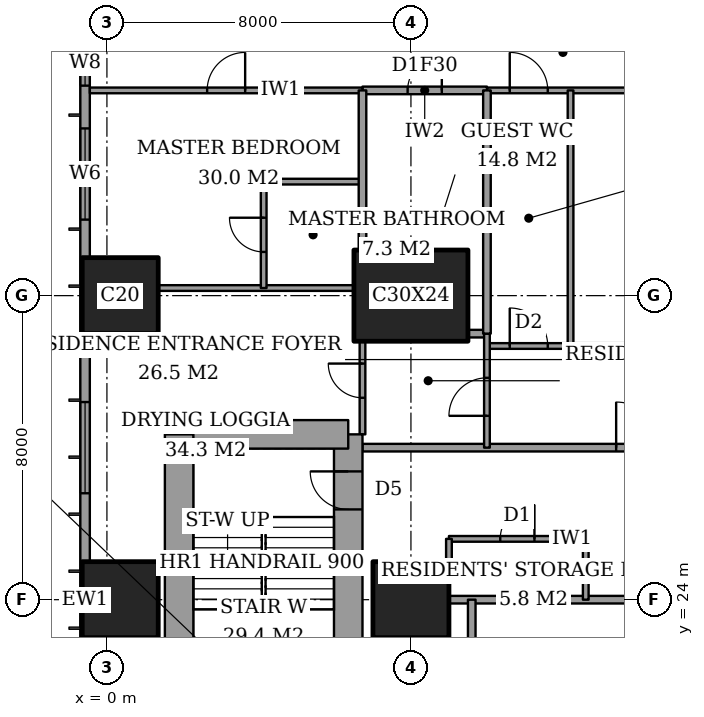
"""IFC4 building model, lengths in metres.
Left out: names, types, materials, properties, quantities, classifications, styles, units other than length and angle.
Written with IfcOpenShell. Run it as: python <this file> out.ifc"""

import sys

from ifc_helpers import new_model, si_unit, direction, frame, frame_2d, origin, origin_2d, place, context, subcontext, project, spatial, rectangle, extrude, element, fill, save


model = new_model("IFC4")
c1 = context("Model", 3, precision=1e-05, world=origin(), true_north=direction((0.0, 1.0)))
c2 = subcontext(c1, "Body", "Model", "MODEL_VIEW")
j1 = project(units=[si_unit("LENGTHUNIT", "METRE"), si_unit("PLANEANGLEUNIT", "RADIAN")], contexts=[c1])
p1 = place(None, origin())
s1 = spatial("IfcSite", under=j1, at=p1, CompositionType="ELEMENT")
p2 = place(p1, origin())
s2 = spatial("IfcBuilding", under=s1, at=p2, CompositionType="ELEMENT")
p3 = place(p2, frame((0.0, 0.0, 80.0)))
s3 = spatial("IfcBuildingStorey", under=s2, at=p3, CompositionType="ELEMENT", Elevation=80.0)
for number, where, z_axis, x_axis in (
    (1, (0.35, 24.0, 0.0), (0.0, 0.0, 1.0), (1.0, 0.0, 0.0)),
    (2, (0.35, 32.0, 0.0), (0.0, 0.0, 1.0), (1.0, 0.0, 0.0)),
    (3, (8.0, 24.0, 0.0), (0.0, 0.0, 1.0), (1.0, 0.0, 0.0)),
):
    element("IfcColumn", number, at=place(p3, frame(where, z_axis=z_axis, x_axis=x_axis)), inside=s3, PredefinedType="COLUMN", context=c2, shape_type="SweptSolid", body=[
        extrude(rectangle(XDim=2.0, YDim=2.0, at=origin_2d()), origin(), (0.0, 0.0, 1.0), 3.6),
    ])
p4 = place(p3, frame((8.0, 32.0, 0.0), z_axis=(0.0, 0.0, 1.0), x_axis=(1.0, 0.0, 0.0)))
e4 = element("IfcColumn", 4, at=p4, inside=s3, PredefinedType="COLUMN", context=c2, shape_type="SweptSolid", body=[
    extrude(rectangle(XDim=3.0, YDim=2.4, at=origin_2d()), origin(), (0.0, 0.0, 1.0), 3.6),
])
p5 = place(p3, frame((6.35, 19.65, 0.0), z_axis=(0.0, 0.0, 1.0), x_axis=(0.0, 1.0, 0.0)))
e5 = element("IfcWall", 5, at=p5, inside=s3, PredefinedType="SHEAR", context=c2, shape_type="SweptSolid", body=[
    extrude(rectangle(XDim=8.7, YDim=0.75, at=frame_2d((4.35, 0.0))), origin(), (0.0, 0.0, 1.0), 3.6),
])
p6 = place(p5, frame((6.725, 0.0, 0.0)))
e6 = element("IfcOpeningElement", 6, at=p6, cuts=e5, PredefinedType="OPENING", context=c2, shape_type="SweptSolid", body=[
    extrude(rectangle(XDim=1.0, YDim=2.1, at=frame_2d((0.5, 1.05))), frame((0.0, 0.385, 0.0), z_axis=(0.0, -1.0, 0.0), x_axis=(1.0, 0.0, 0.0)), (0.0, 0.0, 1.0), 0.77),
])
p7 = place(p3, frame((6.35, 28.35, 0.0), z_axis=(0.0, 0.0, 1.0), x_axis=(-1.0, 0.0, 0.0)))
e7 = element("IfcWall", 7, at=p7, inside=s3, PredefinedType="SHEAR", context=c2, shape_type="SweptSolid", body=[
    extrude(rectangle(XDim=4.45, YDim=0.75, at=frame_2d((2.225, 0.0))), origin(), (0.0, 0.0, 1.0), 3.6),
])
p8 = place(p3, frame((1.9, 28.35, 0.0), z_axis=(0.0, 0.0, 1.0), x_axis=(0.0, -1.0, 0.0)))
e8 = element("IfcWall", 8, at=p8, inside=s3, PredefinedType="SHEAR", context=c2, shape_type="SweptSolid", body=[
    extrude(rectangle(XDim=8.7, YDim=0.75, at=frame_2d((4.35, 0.0))), origin(), (0.0, 0.0, 1.0), 3.6),
])
p9 = place(p3, frame((-0.575, 44.825, 0.0), z_axis=(0.0, 0.0, 1.0), x_axis=(0.0, -1.0, 0.0)))
e9 = element("IfcWall", 9, at=p9, inside=s3, PredefinedType="SOLIDWALL", context=c2, shape_type="SweptSolid", body=[
    extrude(rectangle(XDim=41.65, YDim=0.25, at=frame_2d((20.825, 0.0))), origin(), (0.0, 0.0, 1.0), 3.6),
])
p10 = place(p9, frame((0.775, 0.0, 0.6)))
e10 = element("IfcOpeningElement", 10, at=p10, cuts=e9, PredefinedType="OPENING", context=c2, shape_type="SweptSolid", body=[
    extrude(rectangle(XDim=2.4, YDim=2.0, at=frame_2d((1.2, 1.0))), frame((0.0, 0.135, 0.0), z_axis=(0.0, -1.0, 0.0), x_axis=(1.0, 0.0, 0.0)), (0.0, 0.0, 1.0), 0.27),
])
p11 = place(p9, frame((6.1, 0.0, 0.6)))
e11 = element("IfcOpeningElement", 11, at=p11, cuts=e9, PredefinedType="OPENING", context=c2, shape_type="SweptSolid", body=[
    extrude(rectangle(XDim=1.2, YDim=2.0, at=frame_2d((0.6, 1.0))), frame((0.0, 0.135, 0.0), z_axis=(0.0, -1.0, 0.0), x_axis=(1.0, 0.0, 0.0)), (0.0, 0.0, 1.0), 0.27),
])
p12 = place(p9, frame((8.425, 0.0, 0.6)))
e12 = element("IfcOpeningElement", 12, at=p12, cuts=e9, PredefinedType="OPENING", context=c2, shape_type="SweptSolid", body=[
    extrude(rectangle(XDim=2.4, YDim=2.0, at=frame_2d((1.2, 1.0))), frame((0.0, 0.135, 0.0), z_axis=(0.0, -1.0, 0.0), x_axis=(1.0, 0.0, 0.0)), (0.0, 0.0, 1.0), 0.27),
])
p13 = place(p9, frame((15.625, 0.0, 0.6)))
e13 = element("IfcOpeningElement", 13, at=p13, cuts=e9, PredefinedType="OPENING", context=c2, shape_type="SweptSolid", body=[
    extrude(rectangle(XDim=2.4, YDim=2.0, at=frame_2d((1.2, 1.0))), frame((0.0, 0.135, 0.0), z_axis=(0.0, -1.0, 0.0), x_axis=(1.0, 0.0, 0.0)), (0.0, 0.0, 1.0), 0.27),
])
p14 = place(p9, frame((23.625, 0.0, 0.6)))
e14 = element("IfcOpeningElement", 14, at=p14, cuts=e9, PredefinedType="OPENING", context=c2, shape_type="SweptSolid", body=[
    extrude(rectangle(XDim=2.4, YDim=2.0, at=frame_2d((1.2, 1.0))), frame((0.0, 0.135, 0.0), z_axis=(0.0, -1.0, 0.0), x_axis=(1.0, 0.0, 0.0)), (0.0, 0.0, 1.0), 0.27),
])
p15 = place(p9, frame((30.825, 0.0, 0.6)))
e15 = element("IfcOpeningElement", 15, at=p15, cuts=e9, PredefinedType="OPENING", context=c2, shape_type="SweptSolid", body=[
    extrude(rectangle(XDim=2.4, YDim=2.0, at=frame_2d((1.2, 1.0))), frame((0.0, 0.135, 0.0), z_axis=(0.0, -1.0, 0.0), x_axis=(1.0, 0.0, 0.0)), (0.0, 0.0, 1.0), 0.27),
])
p16 = place(p9, frame((34.5, 0.0, 0.6)))
e16 = element("IfcOpeningElement", 16, at=p16, cuts=e9, PredefinedType="OPENING", context=c2, shape_type="SweptSolid", body=[
    extrude(rectangle(XDim=1.2, YDim=2.0, at=frame_2d((0.6, 1.0))), frame((0.0, 0.135, 0.0), z_axis=(0.0, -1.0, 0.0), x_axis=(1.0, 0.0, 0.0)), (0.0, 0.0, 1.0), 0.27),
])
p17 = place(p9, frame((38.475, 0.0, 0.6)))
e17 = element("IfcOpeningElement", 17, at=p17, cuts=e9, PredefinedType="OPENING", context=c2, shape_type="SweptSolid", body=[
    extrude(rectangle(XDim=2.4, YDim=2.0, at=frame_2d((1.2, 1.0))), frame((0.0, 0.135, 0.0), z_axis=(0.0, -1.0, 0.0), x_axis=(1.0, 0.0, 0.0)), (0.0, 0.0, 1.0), 0.27),
])
p18 = place(p3, frame((9.0, 24.0, 0.0), z_axis=(0.0, 0.0, 1.0), x_axis=(1.0, 0.0, 0.0)))
e18 = element("IfcWall", 18, at=p18, inside=s3, PredefinedType="PARTITIONING", context=c2, shape_type="SweptSolid", body=[
    extrude(rectangle(XDim=6.0, YDim=0.2, at=frame_2d((3.0, 0.0))), origin(), (0.0, 0.0, 1.0), 3.35),
])
p19 = place(p3, frame((9.0, 25.6, 0.0), z_axis=(0.0, 0.0, 1.0), x_axis=(1.0, 0.0, 0.0)))
e19 = element("IfcWall", 19, at=p19, inside=s3, PredefinedType="PARTITIONING", context=c2, shape_type="SweptSolid", body=[
    extrude(rectangle(XDim=3.6, YDim=0.15, at=frame_2d((1.8, 0.0))), origin(), (0.0, 0.0, 1.0), 3.35),
])
p20 = place(p19, frame((1.35, 0.0, 0.0)))
e20 = element("IfcOpeningElement", 20, at=p20, cuts=e19, PredefinedType="OPENING", context=c2, shape_type="SweptSolid", body=[
    extrude(rectangle(XDim=0.9, YDim=2.1, at=frame_2d((0.45, 1.05))), frame((0.0, 0.085, 0.0), z_axis=(0.0, -1.0, 0.0), x_axis=(1.0, 0.0, 0.0)), (0.0, 0.0, 1.0), 0.17),
])
p21 = place(p3, frame((6.725, 28.0, 0.0), z_axis=(0.0, 0.0, 1.0), x_axis=(1.0, 0.0, 0.0)))
e21 = element("IfcWall", 21, at=p21, inside=s3, PredefinedType="PARTITIONING", context=c2, shape_type="SweptSolid", body=[
    extrude(rectangle(XDim=17.275, YDim=0.2, at=frame_2d((8.637, 0.0))), origin(), (0.0, 0.0, 1.0), 3.35),
])
p22 = place(p21, frame((6.675, 0.0, 0.0)))
e22 = element("IfcOpeningElement", 22, at=p22, cuts=e21, PredefinedType="OPENING", context=c2, shape_type="SweptSolid", body=[
    extrude(rectangle(XDim=1.2, YDim=2.4, at=frame_2d((0.6, 1.2))), frame((0.0, 0.11, 0.0), z_axis=(0.0, -1.0, 0.0), x_axis=(1.0, 0.0, 0.0)), (0.0, 0.0, 1.0), 0.22),
])
p23 = place(p3, frame((10.0, 30.675, 0.0), z_axis=(0.0, 0.0, 1.0), x_axis=(1.0, 0.0, 0.0)))
e23 = element("IfcWall", 23, at=p23, inside=s3, PredefinedType="PARTITIONING", context=c2, shape_type="SweptSolid", body=[
    extrude(rectangle(XDim=4.4, YDim=0.15, at=frame_2d((2.2, 0.0))), origin(), (0.0, 0.0, 1.0), 3.35),
])
p24 = place(p23, frame((0.6, 0.0, 0.0)))
e24 = element("IfcOpeningElement", 24, at=p24, cuts=e23, PredefinedType="OPENING", context=c2, shape_type="SweptSolid", body=[
    extrude(rectangle(XDim=1.0, YDim=2.1, at=frame_2d((0.5, 1.05))), frame((0.0, 0.085, 0.0), z_axis=(0.0, -1.0, 0.0), x_axis=(1.0, 0.0, 0.0)), (0.0, 0.0, 1.0), 0.17),
])
p25 = place(p3, frame((9.5, 31.0, 0.0), z_axis=(0.0, 0.0, 1.0), x_axis=(1.0, 0.0, 0.0)))
e25 = element("IfcWall", 25, at=p25, inside=s3, PredefinedType="PARTITIONING", context=c2, shape_type="SweptSolid", body=[
    extrude(rectangle(XDim=0.5, YDim=0.2, at=frame_2d((0.25, 0.0))), origin(), (0.0, 0.0, 1.0), 3.35),
])
p26 = place(p3, frame((1.35, 32.2, 0.0), z_axis=(0.0, 0.0, 1.0), x_axis=(1.0, 0.0, 0.0)))
e26 = element("IfcWall", 26, at=p26, inside=s3, PredefinedType="PARTITIONING", context=c2, shape_type="SweptSolid", body=[
    extrude(rectangle(XDim=5.15, YDim=0.15, at=frame_2d((2.575, 0.0))), origin(), (0.0, 0.0, 1.0), 3.35),
])
p27 = place(p3, frame((4.125, 35.0, 0.0), z_axis=(0.0, 0.0, 1.0), x_axis=(1.0, 0.0, 0.0)))
e27 = element("IfcWall", 27, at=p27, inside=s3, PredefinedType="PARTITIONING", context=c2, shape_type="SweptSolid", body=[
    extrude(rectangle(XDim=2.6, YDim=0.15, at=frame_2d((1.3, 0.0))), origin(), (0.0, 0.0, 1.0), 3.35),
])
p28 = place(p3, frame((6.725, 37.4, 0.0), z_axis=(0.0, 0.0, 1.0), x_axis=(1.0, 0.0, 0.0)))
e28 = element("IfcWall", 28, at=p28, inside=s3, PredefinedType="PARTITIONING", context=c2, shape_type="SweptSolid", body=[
    extrude(rectangle(XDim=3.275, YDim=0.2, at=frame_2d((1.637, 0.0))), origin(), (0.0, 0.0, 1.0), 3.35),
])
p29 = place(p28, frame((1.188, 0.0, 0.0)))
e29 = element("IfcOpeningElement", 29, at=p29, cuts=e28, PredefinedType="OPENING", context=c2, shape_type="SweptSolid", body=[
    extrude(rectangle(XDim=0.9, YDim=2.1, at=frame_2d((0.45, 1.05))), frame((0.0, 0.11, 0.0), z_axis=(0.0, -1.0, 0.0), x_axis=(1.0, 0.0, 0.0)), (0.0, 0.0, 1.0), 0.22),
])
p30 = place(p3, frame((-0.45, 37.4, 0.0), z_axis=(0.0, 0.0, 1.0), x_axis=(1.0, 0.0, 0.0)))
e30 = element("IfcWall", 30, at=p30, inside=s3, PredefinedType="PARTITIONING", context=c2, shape_type="SweptSolid", body=[
    extrude(rectangle(XDim=7.175, YDim=0.15, at=frame_2d((3.587, 0.0))), origin(), (0.0, 0.0, 1.0), 3.35),
])
p31 = place(p30, frame((3.087, 0.0, 0.0)))
e31 = element("IfcOpeningElement", 31, at=p31, cuts=e30, PredefinedType="OPENING", context=c2, shape_type="SweptSolid", body=[
    extrude(rectangle(XDim=1.0, YDim=2.1, at=frame_2d((0.5, 1.05))), frame((0.0, 0.085, 0.0), z_axis=(0.0, -1.0, 0.0), x_axis=(1.0, 0.0, 0.0)), (0.0, 0.0, 1.0), 0.17),
])
p32 = place(p3, frame((10.0, 37.4, 0.0), z_axis=(0.0, 0.0, 1.0), x_axis=(1.0, 0.0, 0.0)))
e32 = element("IfcWall", 32, at=p32, inside=s3, PredefinedType="PARTITIONING", context=c2, shape_type="SweptSolid", body=[
    extrude(rectangle(XDim=14.561, YDim=0.15, at=frame_2d((7.281, 0.0))), origin(), (0.0, 0.0, 1.0), 3.35),
])
p33 = place(p32, frame((0.6, 0.0, 0.0)))
e33 = element("IfcOpeningElement", 33, at=p33, cuts=e32, PredefinedType="OPENING", context=c2, shape_type="SweptSolid", body=[
    extrude(rectangle(XDim=1.0, YDim=2.1, at=frame_2d((0.5, 1.05))), frame((0.0, 0.085, 0.0), z_axis=(0.0, -1.0, 0.0), x_axis=(1.0, 0.0, 0.0)), (0.0, 0.0, 1.0), 0.17),
])
p34 = place(p32, frame((4.6, 0.0, 0.0)))
e34 = element("IfcOpeningElement", 34, at=p34, cuts=e32, PredefinedType="OPENING", context=c2, shape_type="SweptSolid", body=[
    extrude(rectangle(XDim=1.0, YDim=2.1, at=frame_2d((0.5, 1.05))), frame((0.0, 0.085, 0.0), z_axis=(0.0, -1.0, 0.0), x_axis=(1.0, 0.0, 0.0)), (0.0, 0.0, 1.0), 0.17),
])
p35 = place(p32, frame((10.725, 0.0, 0.0)))
e35 = element("IfcOpeningElement", 35, at=p35, cuts=e32, PredefinedType="OPENING", context=c2, shape_type="SweptSolid", body=[
    extrude(rectangle(XDim=1.0, YDim=2.1, at=frame_2d((0.5, 1.05))), frame((0.0, 0.085, 0.0), z_axis=(0.0, -1.0, 0.0), x_axis=(1.0, 0.0, 0.0)), (0.0, 0.0, 1.0), 0.17),
])
p36 = place(p3, frame((4.125, 32.2, 0.0), z_axis=(0.0, 0.0, 1.0), x_axis=(0.0, 1.0, 0.0)))
e36 = element("IfcWall", 36, at=p36, inside=s3, PredefinedType="PARTITIONING", context=c2, shape_type="SweptSolid", body=[
    extrude(rectangle(XDim=2.8, YDim=0.15, at=frame_2d((1.4, 0.0))), origin(), (0.0, 0.0, 1.0), 3.35),
])
p37 = place(p36, frame((0.95, 0.0, 0.0)))
e37 = element("IfcOpeningElement", 37, at=p37, cuts=e36, PredefinedType="OPENING", context=c2, shape_type="SweptSolid", body=[
    extrude(rectangle(XDim=0.9, YDim=2.1, at=frame_2d((0.45, 1.05))), frame((0.0, 0.085, 0.0), z_axis=(0.0, -1.0, 0.0), x_axis=(1.0, 0.0, 0.0)), (0.0, 0.0, 1.0), 0.17),
])
p38 = place(p3, frame((6.725, 33.2, 0.0), z_axis=(0.0, 0.0, 1.0), x_axis=(0.0, 1.0, 0.0)))
e38 = element("IfcWall", 38, at=p38, inside=s3, PredefinedType="PARTITIONING", context=c2, shape_type="SweptSolid", body=[
    extrude(rectangle(XDim=4.2, YDim=0.2, at=frame_2d((2.1, 0.0))), origin(), (0.0, 0.0, 1.0), 3.35),
])
p39 = place(p3, frame((6.725, 28.35, 0.0), z_axis=(0.0, 0.0, 1.0), x_axis=(0.0, 1.0, 0.0)))
e39 = element("IfcWall", 39, at=p39, inside=s3, PredefinedType="PARTITIONING", context=c2, shape_type="SweptSolid", body=[
    extrude(rectangle(XDim=2.45, YDim=0.15, at=frame_2d((1.225, 0.0))), origin(), (0.0, 0.0, 1.0), 3.35),
])
p40 = place(p39, frame((0.962, 0.0, 0.0)))
e40 = element("IfcOpeningElement", 40, at=p40, cuts=e39, PredefinedType="OPENING", context=c2, shape_type="SweptSolid", body=[
    extrude(rectangle(XDim=0.9, YDim=2.1, at=frame_2d((0.45, 1.05))), frame((0.0, 0.085, 0.0), z_axis=(0.0, -1.0, 0.0), x_axis=(1.0, 0.0, 0.0)), (0.0, 0.0, 1.0), 0.17),
])
p41 = place(p3, frame((9.0, 25.0, 0.0), z_axis=(0.0, 0.0, 1.0), x_axis=(0.0, 1.0, 0.0)))
e41 = element("IfcWall", 41, at=p41, inside=s3, PredefinedType="PARTITIONING", context=c2, shape_type="SweptSolid", body=[
    extrude(rectangle(XDim=0.6, YDim=0.15, at=frame_2d((0.3, 0.0))), origin(), (0.0, 0.0, 1.0), 3.35),
])
p42 = place(p3, frame((9.6, 21.6, 0.0), z_axis=(0.0, 0.0, 1.0), x_axis=(0.0, 1.0, 0.0)))
e42 = element("IfcWall", 42, at=p42, inside=s3, PredefinedType="PARTITIONING", context=c2, shape_type="SweptSolid", body=[
    extrude(rectangle(XDim=2.4, YDim=0.2, at=frame_2d((1.2, 0.0))), origin(), (0.0, 0.0, 1.0), 3.35),
])
p43 = place(p3, frame((10.0, 31.0, 0.0), z_axis=(0.0, 0.0, 1.0), x_axis=(0.0, 1.0, 0.0)))
e43 = element("IfcWall", 43, at=p43, inside=s3, PredefinedType="PARTITIONING", context=c2, shape_type="SweptSolid", body=[
    extrude(rectangle(XDim=6.4, YDim=0.2, at=frame_2d((3.2, 0.0))), origin(), (0.0, 0.0, 1.0), 3.35),
])
p44 = place(p3, frame((10.0, 28.0, 0.0), z_axis=(0.0, 0.0, 1.0), x_axis=(0.0, 1.0, 0.0)))
e44 = element("IfcWall", 44, at=p44, inside=s3, PredefinedType="PARTITIONING", context=c2, shape_type="SweptSolid", body=[
    extrude(rectangle(XDim=3.0, YDim=0.15, at=frame_2d((1.5, 0.0))), origin(), (0.0, 0.0, 1.0), 3.35),
])
p45 = place(p44, frame((0.837, 0.0, 0.0)))
e45 = element("IfcOpeningElement", 45, at=p45, cuts=e44, PredefinedType="OPENING", context=c2, shape_type="SweptSolid", body=[
    extrude(rectangle(XDim=1.0, YDim=2.1, at=frame_2d((0.5, 1.05))), frame((0.0, 0.085, 0.0), z_axis=(0.0, -1.0, 0.0), x_axis=(1.0, 0.0, 0.0)), (0.0, 0.0, 1.0), 0.17),
])
p46 = place(p3, frame((12.2, 30.675, 0.0), z_axis=(0.0, 0.0, 1.0), x_axis=(0.0, 1.0, 0.0)))
e46 = element("IfcWall", 46, at=p46, inside=s3, PredefinedType="PARTITIONING", context=c2, shape_type="SweptSolid", body=[
    extrude(rectangle(XDim=6.725, YDim=0.15, at=frame_2d((3.362, 0.0))), origin(), (0.0, 0.0, 1.0), 3.35),
])
p47 = place(p3, frame((12.6, 24.0, 0.0), z_axis=(0.0, 0.0, 1.0), x_axis=(0.0, 1.0, 0.0)))
e47 = element("IfcWall", 47, at=p47, inside=s3, PredefinedType="PARTITIONING", context=c2, shape_type="SweptSolid", body=[
    extrude(rectangle(XDim=1.6, YDim=0.15, at=frame_2d((0.8, 0.0))), origin(), (0.0, 0.0, 1.0), 3.35),
])
p48 = place(p11, origin())
e48 = element("IfcWindow", 48, at=p48, inside=s3, PartitioningType="SINGLE_PANEL", PredefinedType="WINDOW", context=c2, shape_type="SweptSolid", body=[
    extrude(rectangle(XDim=1.2, YDim=2.0, at=frame_2d((0.6, 1.0))), frame((0.0, 0.03, 0.0), z_axis=(0.0, -1.0, 0.0), x_axis=(1.0, 0.0, 0.0)), (0.0, 0.0, 1.0), 0.06),
])
fill(e11, e48)
p49 = place(p12, origin())
e49 = element("IfcWindow", 49, at=p49, inside=s3, PartitioningType="SINGLE_PANEL", PredefinedType="WINDOW", context=c2, shape_type="SweptSolid", body=[
    extrude(rectangle(XDim=2.4, YDim=2.0, at=frame_2d((1.2, 1.0))), frame((0.0, 0.03, 0.0), z_axis=(0.0, -1.0, 0.0), x_axis=(1.0, 0.0, 0.0)), (0.0, 0.0, 1.0), 0.06),
])
fill(e12, e49)
p50 = place(p13, origin())
e50 = element("IfcWindow", 50, at=p50, inside=s3, PartitioningType="SINGLE_PANEL", PredefinedType="WINDOW", context=c2, shape_type="SweptSolid", body=[
    extrude(rectangle(XDim=2.4, YDim=2.0, at=frame_2d((1.2, 1.0))), frame((0.0, 0.03, 0.0), z_axis=(0.0, -1.0, 0.0), x_axis=(1.0, 0.0, 0.0)), (0.0, 0.0, 1.0), 0.06),
])
fill(e13, e50)
p51 = place(p33, origin())
e51 = element("IfcDoor", 51, at=p51, inside=s3, OperationType="SINGLE_SWING_RIGHT", PredefinedType="DOOR", context=c2, shape_type="SweptSolid", body=[
    extrude(rectangle(XDim=1.0, YDim=2.1, at=frame_2d((0.5, 1.05))), frame((0.0, 0.025, 0.0), z_axis=(0.0, -1.0, 0.0), x_axis=(1.0, 0.0, 0.0)), (0.0, 0.0, 1.0), 0.05),
])
fill(e33, e51)
p52 = place(p37, origin())
e52 = element("IfcDoor", 52, at=p52, inside=s3, OperationType="SINGLE_SWING_LEFT", PredefinedType="DOOR", context=c2, shape_type="SweptSolid", body=[
    extrude(rectangle(XDim=0.9, YDim=2.1, at=frame_2d((0.45, 1.05))), frame((0.0, 0.025, 0.0), z_axis=(0.0, -1.0, 0.0), x_axis=(1.0, 0.0, 0.0)), (0.0, 0.0, 1.0), 0.05),
])
fill(e37, e52)
p53 = place(p31, origin())
e53 = element("IfcDoor", 53, at=p53, inside=s3, OperationType="SINGLE_SWING_LEFT", PredefinedType="DOOR", context=c2, shape_type="SweptSolid", body=[
    extrude(rectangle(XDim=1.0, YDim=2.1, at=frame_2d((0.5, 1.05))), frame((0.0, 0.025, 0.0), z_axis=(0.0, -1.0, 0.0), x_axis=(1.0, 0.0, 0.0)), (0.0, 0.0, 1.0), 0.05),
])
fill(e31, e53)
p54 = place(p40, origin())
e54 = element("IfcDoor", 54, at=p54, inside=s3, OperationType="SINGLE_SWING_LEFT", PredefinedType="DOOR", context=c2, shape_type="SweptSolid", body=[
    extrude(rectangle(XDim=0.9, YDim=2.1, at=frame_2d((0.45, 1.05))), frame((0.0, 0.025, 0.0), z_axis=(0.0, -1.0, 0.0), x_axis=(1.0, 0.0, 0.0)), (0.0, 0.0, 1.0), 0.05),
])
fill(e40, e54)
p55 = place(p29, origin())
e55 = element("IfcDoor", 55, at=p55, inside=s3, OperationType="SINGLE_SWING_LEFT", PredefinedType="DOOR", context=c2, shape_type="SweptSolid", body=[
    extrude(rectangle(XDim=0.9, YDim=2.1, at=frame_2d((0.45, 1.05))), frame((0.0, 0.025, 0.0), z_axis=(0.0, -1.0, 0.0), x_axis=(1.0, 0.0, 0.0)), (0.0, 0.0, 1.0), 0.05),
])
fill(e29, e55)
p56 = place(p45, origin())
e56 = element("IfcDoor", 56, at=p56, inside=s3, OperationType="SINGLE_SWING_RIGHT", PredefinedType="DOOR", context=c2, shape_type="SweptSolid", body=[
    extrude(rectangle(XDim=1.0, YDim=2.1, at=frame_2d((0.5, 1.05))), frame((0.0, 0.025, 0.0), z_axis=(0.0, -1.0, 0.0), x_axis=(1.0, 0.0, 0.0)), (0.0, 0.0, 1.0), 0.05),
])
fill(e45, e56)
p57 = place(p22, origin())
e57 = element("IfcDoor", 57, at=p57, inside=s3, OperationType="SINGLE_SWING_RIGHT", PredefinedType="DOOR", context=c2, shape_type="SweptSolid", body=[
    extrude(rectangle(XDim=1.2, YDim=2.4, at=frame_2d((0.6, 1.2))), frame((0.0, 0.025, 0.0), z_axis=(0.0, -1.0, 0.0), x_axis=(1.0, 0.0, 0.0)), (0.0, 0.0, 1.0), 0.05),
])
fill(e22, e57)
p58 = place(p24, origin())
e58 = element("IfcDoor", 58, at=p58, inside=s3, OperationType="SINGLE_SWING_RIGHT", PredefinedType="DOOR", context=c2, shape_type="SweptSolid", body=[
    extrude(rectangle(XDim=1.0, YDim=2.1, at=frame_2d((0.5, 1.05))), frame((0.0, 0.025, 0.0), z_axis=(0.0, -1.0, 0.0), x_axis=(1.0, 0.0, 0.0)), (0.0, 0.0, 1.0), 0.05),
])
fill(e24, e58)
p59 = place(p20, origin())
e59 = element("IfcDoor", 59, at=p59, inside=s3, OperationType="SINGLE_SWING_LEFT", PredefinedType="DOOR", context=c2, shape_type="SweptSolid", body=[
    extrude(rectangle(XDim=0.9, YDim=2.1, at=frame_2d((0.45, 1.05))), frame((0.0, 0.025, 0.0), z_axis=(0.0, -1.0, 0.0), x_axis=(1.0, 0.0, 0.0)), (0.0, 0.0, 1.0), 0.05),
])
fill(e20, e59)
p60 = place(p6, origin())
e60 = element("IfcDoor", 60, at=p60, inside=s3, OperationType="SINGLE_SWING_LEFT", PredefinedType="DOOR", context=c2, shape_type="SweptSolid", body=[
    extrude(rectangle(XDim=1.0, YDim=2.1, at=frame_2d((0.5, 1.05))), frame((0.0, 0.025, 0.0), z_axis=(0.0, -1.0, 0.0), x_axis=(1.0, 0.0, 0.0)), (0.0, 0.0, 1.0), 0.05),
])
fill(e6, e60)
save(model, sys.argv[1])
